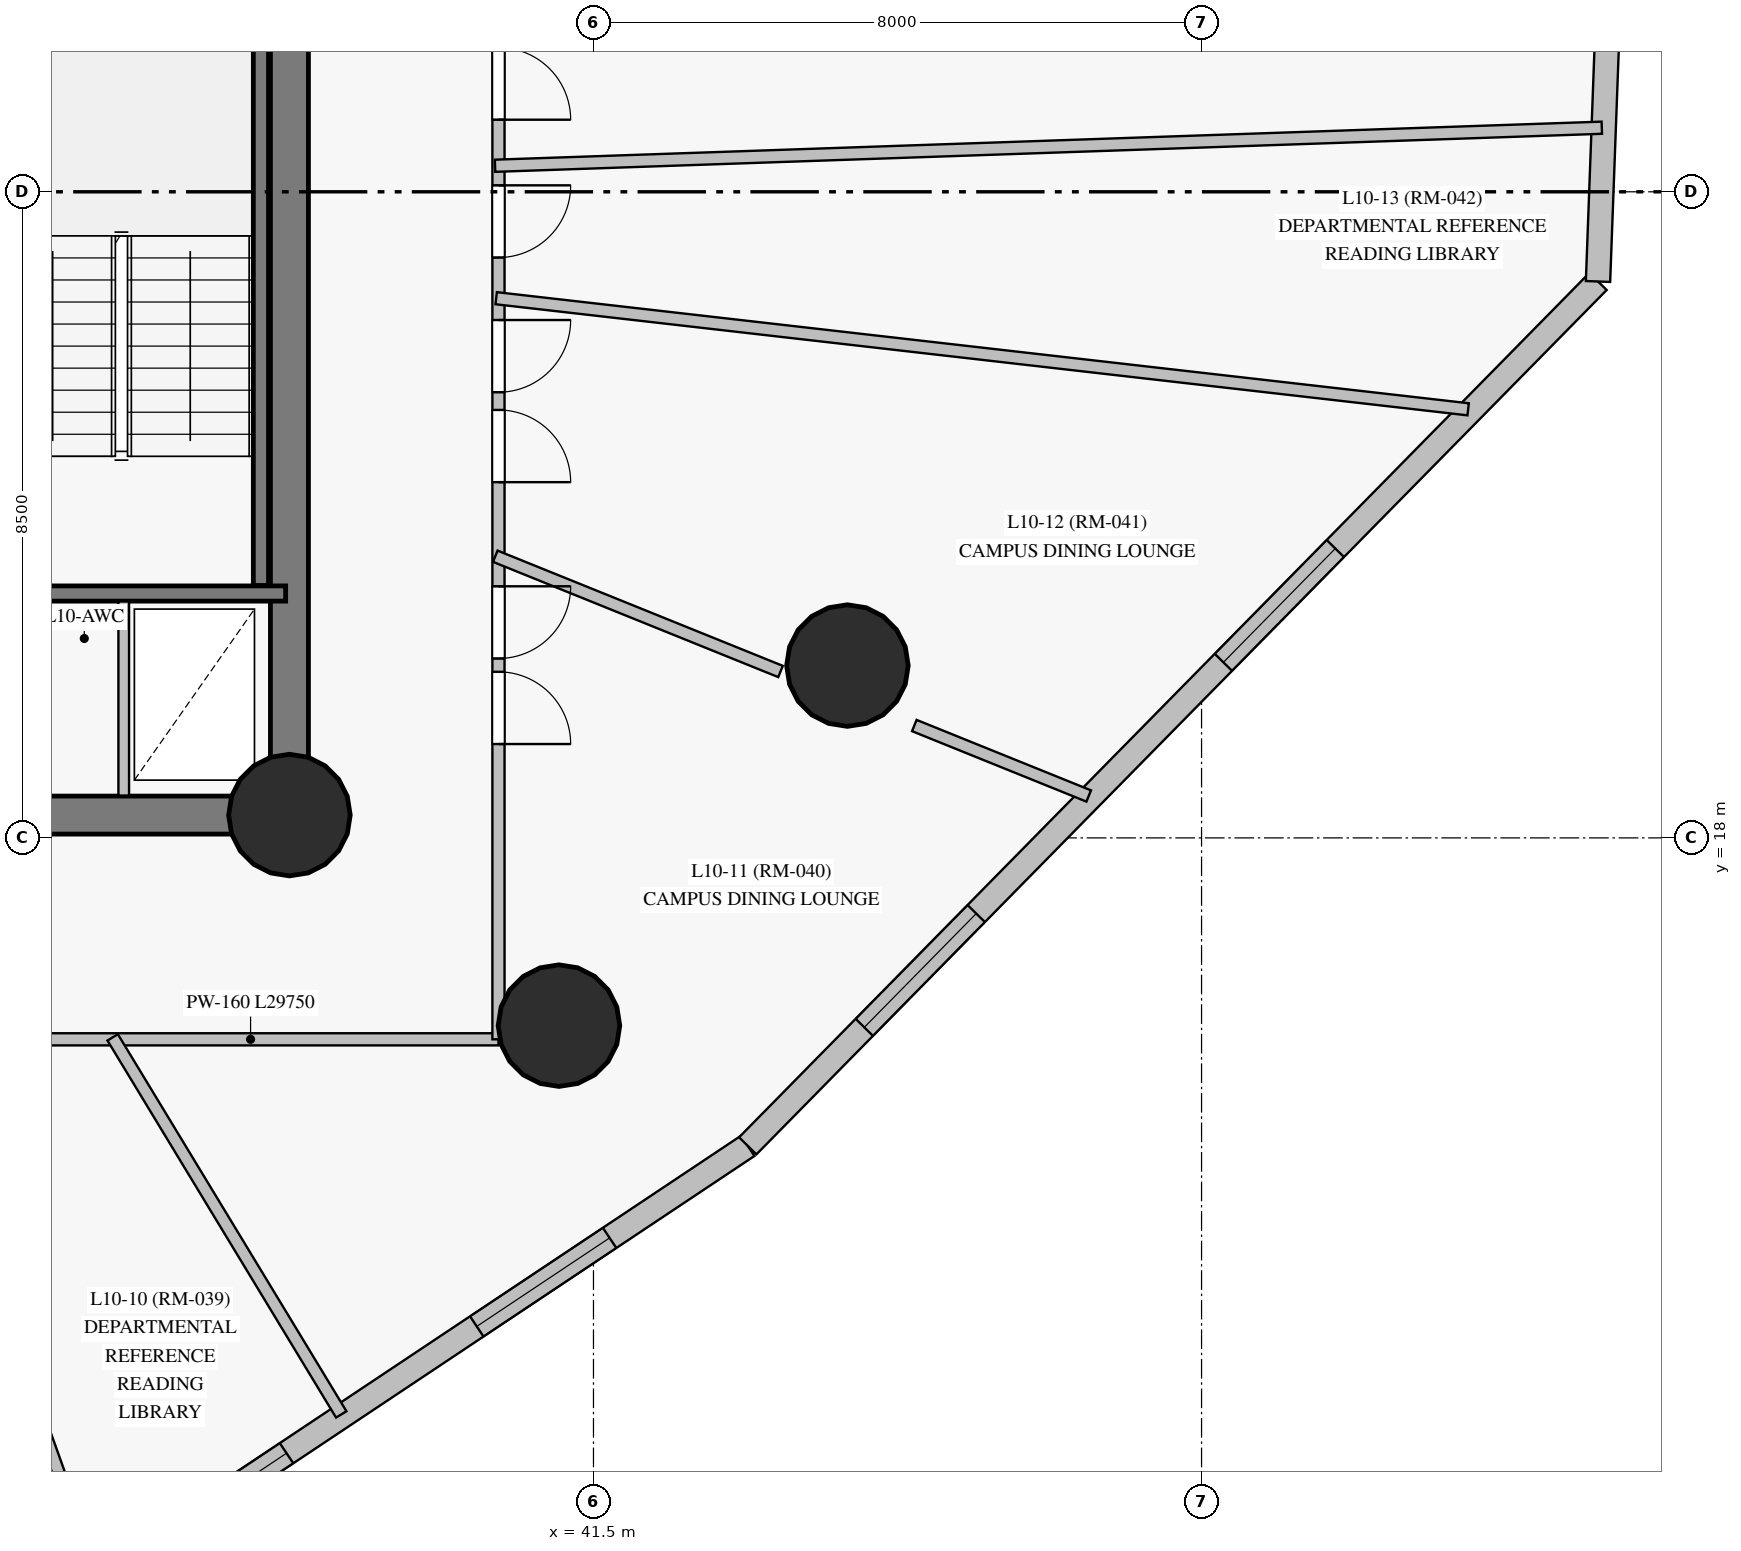
"""IFC4 building model, lengths in metres.
Left out: names, types, materials, properties, quantities, classifications, styles, units other than length and angle.
Written with IfcOpenShell. Run it as: python <this file> out.ifc"""

import sys

from ifc_helpers import new_model, si_unit, direction, frame, frame_2d, origin, origin_with_axes, origin_2d, place, context, subcontext, project, spatial, rectangle, circle, extrude, source, transform, mapped, element, fill, save


model = new_model("IFC4")
c1 = context("Model", 3, precision=1e-05, world=origin(), true_north=direction((0.0, 1.0)))
c2 = subcontext(c1, "Body", "Model", "MODEL_VIEW")
j1 = project(units=[si_unit("LENGTHUNIT", "METRE"), si_unit("PLANEANGLEUNIT", "RADIAN")], contexts=[c1])
p1 = place(None, origin())
s1 = spatial("IfcSite", under=j1, at=p1, CompositionType="ELEMENT")
p2 = place(p1, origin())
s2 = spatial("IfcBuilding", under=s1, at=p2, CompositionType="ELEMENT")
p3 = place(p2, frame((0.0, 0.0, 40.9)))
s3 = spatial("IfcBuildingStorey", under=s2, at=p3, CompositionType="ELEMENT", Elevation=40.9)
p4 = place(p3, frame((26.55, 18.3, 0.0), z_axis=(0.0, 0.0, 1.0), x_axis=(1.0, 0.0, 0.0)))
e1 = element("IfcWall", 1, at=p4, inside=s3, PredefinedType="SHEAR", context=c2, shape_type="SweptSolid", body=[
    extrude(rectangle(XDim=10.95, YDim=0.5, at=frame_2d((5.475, 0.0))), origin(), (0.0, 0.0, 1.0), 3.35),
])
p5 = place(p4, frame((4.55, 0.0, 0.0)))
e2 = element("IfcOpeningElement", 2, at=p5, cuts=e1, PredefinedType="OPENING", context=c2, shape_type="SweptSolid", body=[
    extrude(rectangle(XDim=1.4, YDim=2.2, at=frame_2d((0.7, 1.1))), frame((0.0, 0.26, 0.0), z_axis=(0.0, -1.0, 0.0), x_axis=(1.0, 0.0, 0.0)), (0.0, 0.0, 1.0), 0.52),
])
p6 = place(p3, frame((37.5, 18.3, 0.0), z_axis=(0.0, 0.0, 1.0), x_axis=(0.0, 1.0, 0.0)))
e3 = element("IfcWall", 3, at=p6, inside=s3, PredefinedType="SHEAR", context=c2, shape_type="SweptSolid", body=[
    extrude(rectangle(XDim=16.4, YDim=0.5, at=frame_2d((8.2, 0.0))), origin(), (0.0, 0.0, 1.0), 3.35),
])
p7 = place(p6, frame((14.06, 0.0, 0.0)))
e4 = element("IfcOpeningElement", 4, at=p7, cuts=e3, PredefinedType="OPENING", context=c2, shape_type="SweptSolid", body=[
    extrude(rectangle(XDim=1.2, YDim=2.15, at=frame_2d((0.6, 1.075))), frame((0.0, 0.26, 0.0), z_axis=(0.0, -1.0, 0.0), x_axis=(1.0, 0.0, 0.0)), (0.0, 0.0, 1.0), 0.52),
])
m1 = source(origin_with_axes(), c2, "Body", "SweptSolid", [
    extrude(circle(Radius=0.8, at=origin_2d()), origin(), (0.0, 0.0, 1.0), 3.6),
])
for number, where, z_axis, x_axis in (
    (5, (37.5, 18.3, 0.0), (0.0, 0.0, 1.0), (1.0, 0.0, 0.0)),
    (6, (44.841, 20.267, 0.0), (0.0, 0.0, 1.0), (1.0, 0.0, 0.0)),
    (7, (41.046, 15.53, 0.0), (0.0, 0.0, 1.0), (1.0, 0.0, 0.0)),
):
    element("IfcColumn", number, at=place(p3, frame(where, z_axis=z_axis, x_axis=x_axis)), inside=s3, PredefinedType="COLUMN", context=c2, shape_type="MappedRepresentation", body=[
        mapped(m1, transform((0.0, 0.0, 0.0), scale=1.0)),
    ])
p8 = place(p3, frame((34.299, 7.797, 0.0), z_axis=(0.0, 0.0, 1.0), x_axis=(0.832151862044, 0.554547814437, 0.0)))
e8 = element("IfcWall", 8, at=p8, inside=s3, PredefinedType="SOLIDWALL", context=c2, shape_type="SweptSolid", body=[
    extrude(rectangle(XDim=11.093, YDim=0.32, at=frame_2d((5.546, 0.0))), origin(), (0.0, 0.0, 1.0), 3.35),
])
p9 = place(p8, frame((1.701, 0.0, 0.85)))
e9 = element("IfcOpeningElement", 9, at=p9, cuts=e8, PredefinedType="OPENING", context=c2, shape_type="SweptSolid", body=[
    extrude(rectangle(XDim=2.1, YDim=1.95, at=frame_2d((1.05, 0.975))), frame((0.0, 0.17, 0.0), z_axis=(0.0, -1.0, 0.0), x_axis=(1.0, 0.0, 0.0)), (0.0, 0.0, 1.0), 0.34),
])
p10 = place(p8, frame((6.809, 0.0, 0.85)))
e10 = element("IfcOpeningElement", 10, at=p10, cuts=e8, PredefinedType="OPENING", context=c2, shape_type="SweptSolid", body=[
    extrude(rectangle(XDim=2.1, YDim=1.95, at=frame_2d((1.05, 0.975))), frame((0.0, 0.17, 0.0), z_axis=(0.0, -1.0, 0.0), x_axis=(1.0, 0.0, 0.0)), (0.0, 0.0, 1.0), 0.34),
])
p11 = place(p3, frame((43.53, 13.948, 0.0), z_axis=(0.0, 0.0, 1.0), x_axis=(0.701274555257, 0.712891294763, 0.0)))
e11 = element("IfcWall", 11, at=p11, inside=s3, PredefinedType="SOLIDWALL", context=c2, shape_type="SweptSolid", body=[
    extrude(rectangle(XDim=15.951, YDim=0.32, at=frame_2d((7.976, 0.0))), origin(), (0.0, 0.0, 1.0), 3.35),
])
p12 = place(p11, frame((2.187, 0.0, 0.85)))
e12 = element("IfcOpeningElement", 12, at=p12, cuts=e11, PredefinedType="OPENING", context=c2, shape_type="SweptSolid", body=[
    extrude(rectangle(XDim=2.1, YDim=1.95, at=frame_2d((1.05, 0.975))), frame((0.0, 0.17, 0.0), z_axis=(0.0, -1.0, 0.0), x_axis=(1.0, 0.0, 0.0)), (0.0, 0.0, 1.0), 0.34),
])
p13 = place(p11, frame((8.923, 0.0, 0.85)))
e13 = element("IfcOpeningElement", 13, at=p13, cuts=e11, PredefinedType="OPENING", context=c2, shape_type="SweptSolid", body=[
    extrude(rectangle(XDim=2.1, YDim=1.95, at=frame_2d((1.05, 0.975))), frame((0.0, 0.17, 0.0), z_axis=(0.0, -1.0, 0.0), x_axis=(1.0, 0.0, 0.0)), (0.0, 0.0, 1.0), 0.34),
])
p14 = place(p3, frame((54.716, 25.32, 0.0), z_axis=(0.0, 0.0, 1.0), x_axis=(0.037084791295, 0.99931212254, 0.0)))
e14 = element("IfcWall", 14, at=p14, inside=s3, PredefinedType="SOLIDWALL", context=c2, shape_type="SweptSolid", body=[
    extrude(rectangle(XDim=10.619, YDim=0.32, at=frame_2d((5.31, 0.0))), origin(), (0.0, 0.0, 1.0), 3.35),
])
p15 = place(p14, frame((3.245, 0.0, 0.85)))
e15 = element("IfcOpeningElement", 15, at=p15, cuts=e14, PredefinedType="OPENING", context=c2, shape_type="SweptSolid", body=[
    extrude(rectangle(XDim=2.1, YDim=1.95, at=frame_2d((1.05, 0.975))), frame((0.0, 0.17, 0.0), z_axis=(0.0, -1.0, 0.0), x_axis=(1.0, 0.0, 0.0)), (0.0, 0.0, 1.0), 0.34),
])
p16 = place(p14, frame((7.164, 0.0, 0.85)))
e16 = element("IfcOpeningElement", 16, at=p16, cuts=e14, PredefinedType="OPENING", context=c2, shape_type="SweptSolid", body=[
    extrude(rectangle(XDim=2.1, YDim=1.95, at=frame_2d((1.05, 0.975))), frame((0.0, 0.17, 0.0), z_axis=(0.0, -1.0, 0.0), x_axis=(1.0, 0.0, 0.0)), (0.0, 0.0, 1.0), 0.34),
])
p17 = place(p3, frame((37.125, 21.32, 0.0), z_axis=(0.0, 0.0, 1.0), x_axis=(0.0, 1.0, 0.0)))
e17 = element("IfcWall", 17, at=p17, inside=s3, PredefinedType="SHEAR", context=c2, shape_type="SweptSolid", body=[
    extrude(rectangle(XDim=7.5, YDim=0.2, at=frame_2d((3.75, 0.0))), origin(), (0.0, 0.0, 1.0), 3.35),
])
p18 = place(p3, frame((33.455, 21.215, 0.0), z_axis=(0.0, 0.0, 1.0), x_axis=(1.0, 0.0, 0.0)))
e18 = element("IfcWall", 18, at=p18, inside=s3, PredefinedType="SHEAR", context=c2, shape_type="SweptSolid", body=[
    extrude(rectangle(XDim=3.995, YDim=0.2, at=frame_2d((1.998, 0.0))), origin(), (0.0, 0.0, 1.0), 3.35),
])
p19 = place(p3, frame((40.25, 15.35, 0.0), z_axis=(0.0, 0.0, 1.0), x_axis=(-1.0, 0.0, 0.0)))
e19 = element("IfcWall", 19, at=p19, inside=s3, PredefinedType="PARTITIONING", context=c2, shape_type="SweptSolid", body=[
    extrude(rectangle(XDim=29.75, YDim=0.16, at=frame_2d((14.875, 0.0))), origin(), (0.0, 0.0, 1.0), 2.7),
])
p20 = place(p19, frame((24.315, 0.0, 0.0)))
e20 = element("IfcOpeningElement", 20, at=p20, cuts=e19, PredefinedType="OPENING", context=c2, shape_type="SweptSolid", body=[
    extrude(rectangle(XDim=0.95, YDim=2.15, at=frame_2d((0.475, 1.075))), frame((0.0, 0.09, 0.0), z_axis=(0.0, -1.0, 0.0), x_axis=(1.0, 0.0, 0.0)), (0.0, 0.0, 1.0), 0.18),
])
p21 = place(p19, frame((21.597, 0.0, 0.0)))
e21 = element("IfcOpeningElement", 21, at=p21, cuts=e19, PredefinedType="OPENING", context=c2, shape_type="SweptSolid", body=[
    extrude(rectangle(XDim=0.95, YDim=2.15, at=frame_2d((0.475, 1.075))), frame((0.0, 0.09, 0.0), z_axis=(0.0, -1.0, 0.0), x_axis=(1.0, 0.0, 0.0)), (0.0, 0.0, 1.0), 0.18),
])
p22 = place(p19, frame((18.423, 0.0, 0.0)))
e22 = element("IfcOpeningElement", 22, at=p22, cuts=e19, PredefinedType="OPENING", context=c2, shape_type="SweptSolid", body=[
    extrude(rectangle(XDim=0.95, YDim=2.15, at=frame_2d((0.475, 1.075))), frame((0.0, 0.09, 0.0), z_axis=(0.0, -1.0, 0.0), x_axis=(1.0, 0.0, 0.0)), (0.0, 0.0, 1.0), 0.18),
])
p23 = place(p19, frame((15.67, 0.0, 0.0)))
e23 = element("IfcOpeningElement", 23, at=p23, cuts=e19, PredefinedType="OPENING", context=c2, shape_type="SweptSolid", body=[
    extrude(rectangle(XDim=0.95, YDim=2.15, at=frame_2d((0.475, 1.075))), frame((0.0, 0.09, 0.0), z_axis=(0.0, -1.0, 0.0), x_axis=(1.0, 0.0, 0.0)), (0.0, 0.0, 1.0), 0.18),
])
p24 = place(p19, frame((13.91, 0.0, 0.0)))
e24 = element("IfcOpeningElement", 24, at=p24, cuts=e19, PredefinedType="OPENING", context=c2, shape_type="SweptSolid", body=[
    extrude(rectangle(XDim=0.95, YDim=2.15, at=frame_2d((0.475, 1.075))), frame((0.0, 0.09, 0.0), z_axis=(0.0, -1.0, 0.0), x_axis=(1.0, 0.0, 0.0)), (0.0, 0.0, 1.0), 0.18),
])
p25 = place(p19, frame((9.938, 0.0, 0.0)))
e25 = element("IfcOpeningElement", 25, at=p25, cuts=e19, PredefinedType="OPENING", context=c2, shape_type="SweptSolid", body=[
    extrude(rectangle(XDim=0.95, YDim=2.15, at=frame_2d((0.475, 1.075))), frame((0.0, 0.09, 0.0), z_axis=(0.0, -1.0, 0.0), x_axis=(1.0, 0.0, 0.0)), (0.0, 0.0, 1.0), 0.18),
])
p26 = place(p19, frame((6.522, 0.0, 0.0)))
e26 = element("IfcOpeningElement", 26, at=p26, cuts=e19, PredefinedType="OPENING", context=c2, shape_type="SweptSolid", body=[
    extrude(rectangle(XDim=0.95, YDim=2.15, at=frame_2d((0.475, 1.075))), frame((0.0, 0.09, 0.0), z_axis=(0.0, -1.0, 0.0), x_axis=(1.0, 0.0, 0.0)), (0.0, 0.0, 1.0), 0.18),
])
p27 = place(p3, frame((40.25, 37.65, 0.0), z_axis=(0.0, 0.0, 1.0), x_axis=(0.0, -1.0, 0.0)))
e27 = element("IfcWall", 27, at=p27, inside=s3, PredefinedType="PARTITIONING", context=c2, shape_type="SweptSolid", body=[
    extrude(rectangle(XDim=22.3, YDim=0.16, at=frame_2d((11.15, 0.0))), origin(), (0.0, 0.0, 1.0), 2.75),
])
p28 = place(p27, frame((16.34, 0.0, 0.0)))
e28 = element("IfcOpeningElement", 28, at=p28, cuts=e27, PredefinedType="OPENING", context=c2, shape_type="SweptSolid", body=[
    extrude(rectangle(XDim=0.95, YDim=2.15, at=frame_2d((0.475, 1.075))), frame((0.0, 0.09, 0.0), z_axis=(0.0, -1.0, 0.0), x_axis=(1.0, 0.0, 0.0)), (0.0, 0.0, 1.0), 0.18),
])
p29 = place(p27, frame((14.02, 0.0, 0.0)))
e29 = element("IfcOpeningElement", 29, at=p29, cuts=e27, PredefinedType="OPENING", context=c2, shape_type="SweptSolid", body=[
    extrude(rectangle(XDim=0.95, YDim=2.15, at=frame_2d((0.475, 1.075))), frame((0.0, 0.09, 0.0), z_axis=(0.0, -1.0, 0.0), x_axis=(1.0, 0.0, 0.0)), (0.0, 0.0, 1.0), 0.18),
])
p30 = place(p27, frame((11.065, 0.0, 0.0)))
e30 = element("IfcOpeningElement", 30, at=p30, cuts=e27, PredefinedType="OPENING", context=c2, shape_type="SweptSolid", body=[
    extrude(rectangle(XDim=0.95, YDim=2.15, at=frame_2d((0.475, 1.075))), frame((0.0, 0.09, 0.0), z_axis=(0.0, -1.0, 0.0), x_axis=(1.0, 0.0, 0.0)), (0.0, 0.0, 1.0), 0.18),
])
p31 = place(p27, frame((9.252, 0.0, 0.0)))
e31 = element("IfcOpeningElement", 31, at=p31, cuts=e27, PredefinedType="OPENING", context=c2, shape_type="SweptSolid", body=[
    extrude(rectangle(XDim=0.95, YDim=2.15, at=frame_2d((0.475, 1.075))), frame((0.0, 0.09, 0.0), z_axis=(0.0, -1.0, 0.0), x_axis=(1.0, 0.0, 0.0)), (0.0, 0.0, 1.0), 0.18),
])
p32 = place(p27, frame((3.54, 0.0, 0.0)))
e32 = element("IfcOpeningElement", 32, at=p32, cuts=e27, PredefinedType="OPENING", context=c2, shape_type="SweptSolid", body=[
    extrude(rectangle(XDim=0.95, YDim=2.15, at=frame_2d((0.475, 1.075))), frame((0.0, 0.09, 0.0), z_axis=(0.0, -1.0, 0.0), x_axis=(1.0, 0.0, 0.0)), (0.0, 0.0, 1.0), 0.18),
])
p33 = place(p27, frame((0.96, 0.0, 0.0)))
e33 = element("IfcOpeningElement", 33, at=p33, cuts=e27, PredefinedType="OPENING", context=c2, shape_type="SweptSolid", body=[
    extrude(rectangle(XDim=0.95, YDim=2.15, at=frame_2d((0.475, 1.075))), frame((0.0, 0.09, 0.0), z_axis=(0.0, -1.0, 0.0), x_axis=(1.0, 0.0, 0.0)), (0.0, 0.0, 1.0), 0.18),
])
p34 = place(p27, frame((12.837, 0.0, 0.0)))
e34 = element("IfcOpeningElement", 34, at=p34, cuts=e27, PredefinedType="OPENING", context=c2, shape_type="SweptSolid", body=[
    extrude(rectangle(XDim=0.95, YDim=2.15, at=frame_2d((0.475, 1.075))), frame((0.0, 0.09, 0.0), z_axis=(0.0, -1.0, 0.0), x_axis=(1.0, 0.0, 0.0)), (0.0, 0.0, 1.0), 0.18),
])
p35 = place(p27, frame((17.465, 0.0, 0.0)))
e35 = element("IfcOpeningElement", 35, at=p35, cuts=e27, PredefinedType="OPENING", context=c2, shape_type="SweptSolid", body=[
    extrude(rectangle(XDim=0.95, YDim=2.15, at=frame_2d((0.475, 1.075))), frame((0.0, 0.09, 0.0), z_axis=(0.0, -1.0, 0.0), x_axis=(1.0, 0.0, 0.0)), (0.0, 0.0, 1.0), 0.18),
])
p36 = place(p27, frame((7.605, 0.0, 0.0)))
e36 = element("IfcOpeningElement", 36, at=p36, cuts=e27, PredefinedType="OPENING", context=c2, shape_type="SweptSolid", body=[
    extrude(rectangle(XDim=0.86, YDim=2.04, at=frame_2d((0.43, 1.02))), frame((0.0, 0.09, 0.0), z_axis=(0.0, -1.0, 0.0), x_axis=(1.0, 0.0, 0.0)), (0.0, 0.0, 1.0), 0.18),
])
p37 = place(p3, frame((40.205, 26.842, 0.0), z_axis=(0.0, 0.0, 1.0), x_axis=(0.999409219027, 0.034368778327, 0.0)))
e37 = element("IfcWall", 37, at=p37, inside=s3, PredefinedType="PARTITIONING", context=c2, shape_type="SweptSolid", body=[
    extrude(rectangle(XDim=14.569, YDim=0.16, at=frame_2d((7.285, 0.0))), origin(), (0.0, 0.0, 1.0), 3.35),
])
p38 = place(p3, frame((40.22, 25.1, 0.0), z_axis=(0.0, 0.0, 1.0), x_axis=(0.993530165608, -0.113568525689, 0.0)))
e38 = element("IfcWall", 38, at=p38, inside=s3, PredefinedType="PARTITIONING", context=c2, shape_type="SweptSolid", body=[
    extrude(rectangle(XDim=12.87, YDim=0.16, at=frame_2d((6.435, 0.0))), origin(), (0.0, 0.0, 1.0), 3.35),
])
p39 = place(p3, frame((32.414, 15.378, 0.0), z_axis=(0.0, 0.0, 1.0), x_axis=(0.336803342159, -0.941575014914, 0.0)))
e39 = element("IfcWall", 39, at=p39, inside=s3, PredefinedType="PARTITIONING", context=c2, shape_type="SweptSolid", body=[
    extrude(rectangle(XDim=7.551, YDim=0.16, at=frame_2d((3.775, 0.0))), origin(), (0.0, 0.0, 1.0), 3.35),
])
p40 = place(p3, frame((35.174, 15.376, 0.0), z_axis=(0.0, 0.0, 1.0), x_axis=(0.518438816118, -0.855114725603, 0.0)))
e40 = element("IfcWall", 40, at=p40, inside=s3, PredefinedType="PARTITIONING", context=c2, shape_type="SweptSolid", body=[
    extrude(rectangle(XDim=5.801, YDim=0.16, at=frame_2d((2.901, 0.0))), origin(), (0.0, 0.0, 1.0), 3.35),
])
p41 = place(p3, frame((40.208, 21.705, 0.0), z_axis=(0.0, 0.0, 1.0), x_axis=(0.927189869885, -0.374591704638, 0.0)))
e41 = element("IfcWall", 41, at=p41, inside=s3, PredefinedType="PARTITIONING", context=c2, shape_type="SweptSolid", body=[
    extrude(rectangle(XDim=4.047, YDim=0.16, at=frame_2d((2.024, 0.0))), origin(), (0.0, 0.0, 1.0), 2.7),
])
p42 = place(p3, frame((45.721, 19.478, 0.0), z_axis=(0.0, 0.0, 1.0), x_axis=(0.927185172815, -0.374603330621, 0.0)))
e42 = element("IfcWall", 42, at=p42, inside=s3, PredefinedType="PARTITIONING", context=c2, shape_type="SweptSolid", body=[
    extrude(rectangle(XDim=2.475, YDim=0.16, at=frame_2d((1.237, 0.0))), origin(), (0.0, 0.0, 1.0), 3.35),
])
p43 = place(p3, frame((35.32, 18.557, 0.0), z_axis=(0.0, 0.0, 1.0), x_axis=(0.0, 1.0, 0.0)))
e43 = element("IfcWall", 43, at=p43, inside=s3, PredefinedType="PARTITIONING", context=c2, shape_type="SweptSolid", body=[
    extrude(rectangle(XDim=2.553, YDim=0.14, at=frame_2d((1.277, 0.0))), origin(), (0.0, 0.0, 1.0), 3.35),
])
m2 = source(origin_with_axes(), c2, "Body", "SweptSolid", [
    extrude(rectangle(XDim=2.1, YDim=1.95, at=frame_2d((1.05, 0.975))), frame((0.0, 0.03, 0.0), z_axis=(0.0, -1.0, 0.0), x_axis=(1.0, 0.0, 0.0)), (0.0, 0.0, 1.0), 0.06),
])
p44 = place(p9, origin())
e44 = element("IfcWindow", 44, at=p44, inside=s3, PartitioningType="SINGLE_PANEL", PredefinedType="WINDOW", context=c2, shape_type="MappedRepresentation", body=[
    mapped(m2, transform((0.0, 0.0, 0.0), scale=1.0)),
])
fill(e9, e44)
p45 = place(p10, origin())
e45 = element("IfcWindow", 45, at=p45, inside=s3, PartitioningType="SINGLE_PANEL", PredefinedType="WINDOW", context=c2, shape_type="MappedRepresentation", body=[
    mapped(m2, transform((0.0, 0.0, 0.0), scale=1.0)),
])
fill(e10, e45)
p46 = place(p12, origin())
e46 = element("IfcWindow", 46, at=p46, inside=s3, PartitioningType="SINGLE_PANEL", PredefinedType="WINDOW", context=c2, shape_type="MappedRepresentation", body=[
    mapped(m2, transform((0.0, 0.0, 0.0), scale=1.0)),
])
fill(e12, e46)
p47 = place(p13, origin())
e47 = element("IfcWindow", 47, at=p47, inside=s3, PartitioningType="SINGLE_PANEL", PredefinedType="WINDOW", context=c2, shape_type="MappedRepresentation", body=[
    mapped(m2, transform((0.0, 0.0, 0.0), scale=1.0)),
])
fill(e13, e47)
m3 = source(origin_with_axes(), c2, "Body", "SweptSolid", [
    extrude(rectangle(XDim=0.95, YDim=2.15, at=frame_2d((0.475, 1.075))), frame((0.0, 0.025, 0.0), z_axis=(0.0, -1.0, 0.0), x_axis=(1.0, 0.0, 0.0)), (0.0, 0.0, 1.0), 0.05),
])
p48 = place(p28, origin())
e48 = element("IfcDoor", 48, at=p48, inside=s3, OperationType="SINGLE_SWING_LEFT", PredefinedType="DOOR", context=c2, shape_type="MappedRepresentation", body=[
    mapped(m3, transform((0.0, 0.0, 0.0), scale=1.0)),
])
fill(e28, e48)
p49 = place(p29, origin())
e49 = element("IfcDoor", 49, at=p49, inside=s3, OperationType="SINGLE_SWING_RIGHT", PredefinedType="DOOR", context=c2, shape_type="MappedRepresentation", body=[
    mapped(m3, transform((0.0, 0.0, 0.0), scale=1.0)),
])
fill(e29, e49)
p50 = place(p30, origin())
e50 = element("IfcDoor", 50, at=p50, inside=s3, OperationType="SINGLE_SWING_LEFT", PredefinedType="DOOR", context=c2, shape_type="MappedRepresentation", body=[
    mapped(m3, transform((0.0, 0.0, 0.0), scale=1.0)),
])
fill(e30, e50)
p51 = place(p31, origin())
e51 = element("IfcDoor", 51, at=p51, inside=s3, OperationType="SINGLE_SWING_RIGHT", PredefinedType="DOOR", context=c2, shape_type="MappedRepresentation", body=[
    mapped(m3, transform((0.0, 0.0, 0.0), scale=1.0)),
])
fill(e31, e51)
p52 = place(p34, origin())
e52 = element("IfcDoor", 52, at=p52, inside=s3, OperationType="SINGLE_SWING_LEFT", PredefinedType="DOOR", context=c2, shape_type="MappedRepresentation", body=[
    mapped(m3, transform((0.0, 0.0, 0.0), scale=1.0)),
])
fill(e34, e52)
p53 = place(p35, origin())
e53 = element("IfcDoor", 53, at=p53, inside=s3, OperationType="SINGLE_SWING_RIGHT", PredefinedType="DOOR", context=c2, shape_type="MappedRepresentation", body=[
    mapped(m3, transform((0.0, 0.0, 0.0), scale=1.0)),
])
fill(e35, e53)
save(model, sys.argv[1])
